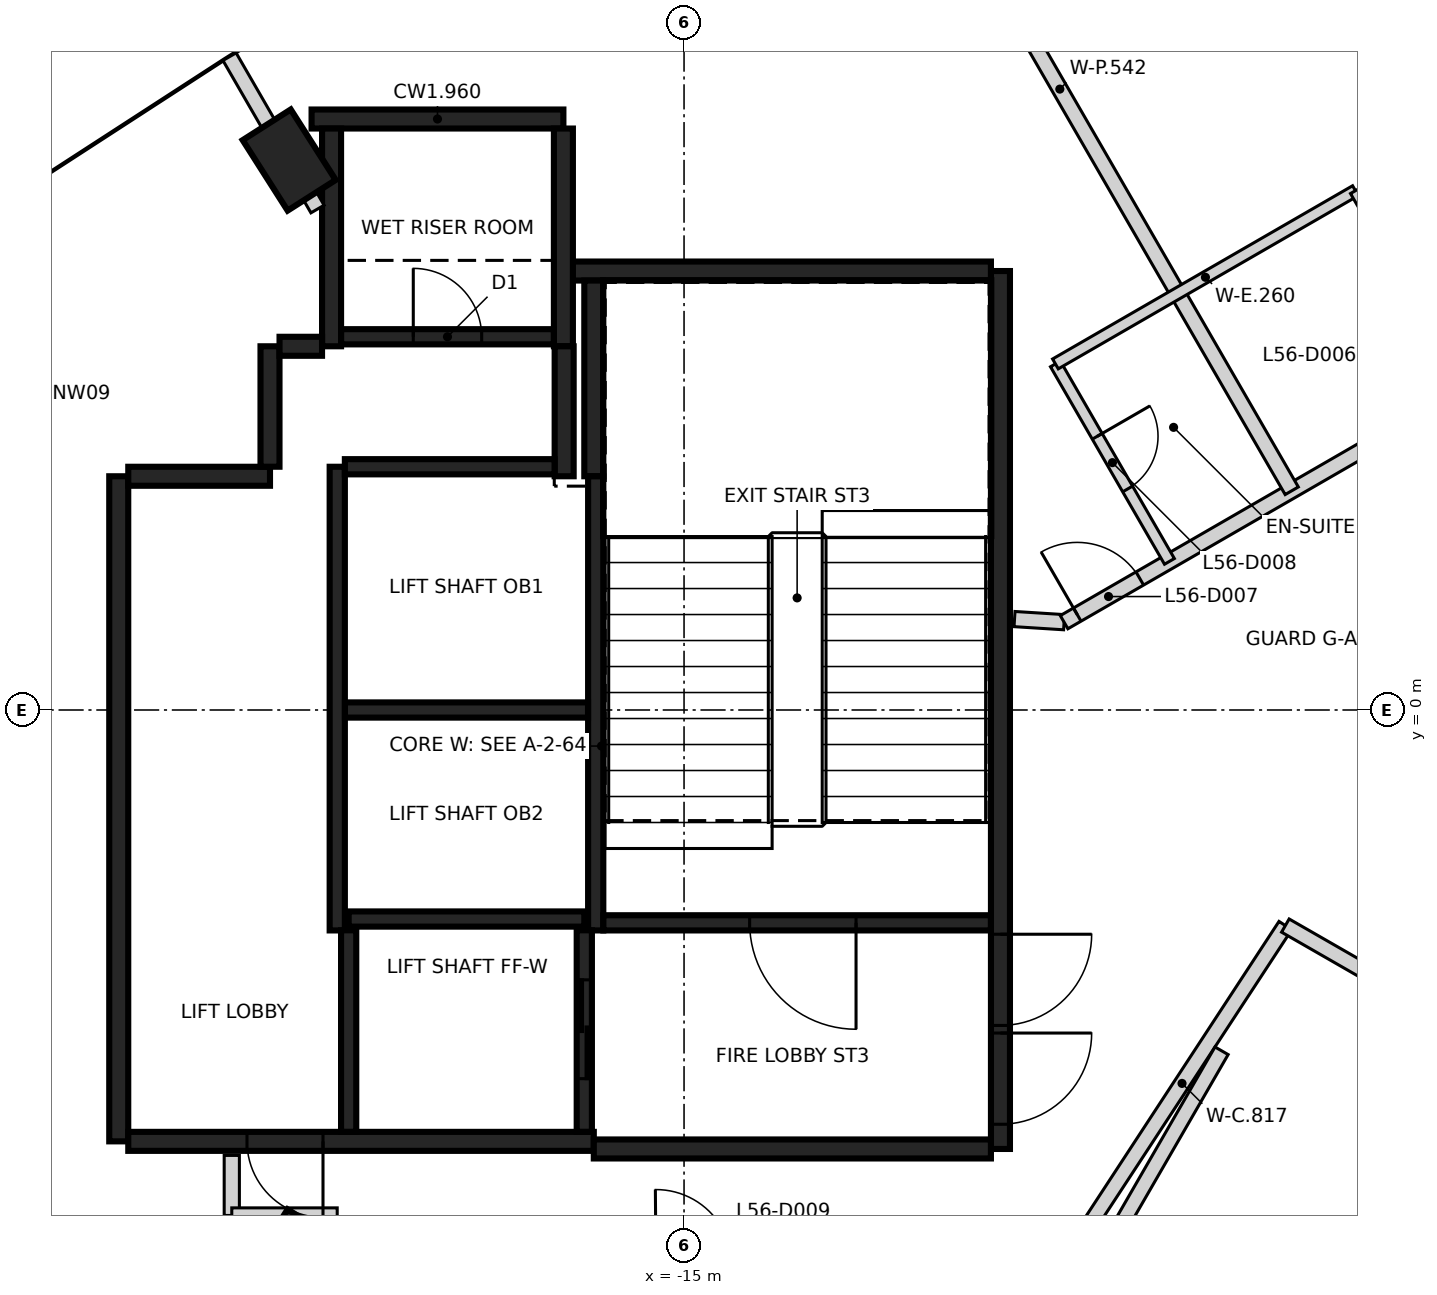
"""IFC4 building model, lengths in metres.
Left out: names, types, materials, properties, quantities, classifications, styles, units other than length and angle.
Written with IfcOpenShell. Run it as: python <this file> out.ifc"""

import sys

from ifc_helpers import new_model, si_unit, direction, frame, frame_2d, origin, origin_2d, place, context, subcontext, project, spatial, rectangle, extrude, element, fill, save


model = new_model("IFC4")
c1 = context("Model", 3, precision=1e-05, world=origin(), true_north=direction((0.0, 1.0)))
c2 = subcontext(c1, "Body", "Model", "MODEL_VIEW")
j1 = project(units=[si_unit("LENGTHUNIT", "METRE"), si_unit("PLANEANGLEUNIT", "RADIAN")], contexts=[c1])
p1 = place(None, origin())
s1 = spatial("IfcSite", under=j1, at=p1, CompositionType="ELEMENT")
p2 = place(p1, origin())
s2 = spatial("IfcBuilding", under=s1, at=p2, CompositionType="ELEMENT")
p3 = place(p2, frame((0.0, 0.0, 225.0)))
s3 = spatial("IfcBuildingStorey", under=s2, at=p3, CompositionType="ELEMENT", Elevation=225.0)
for number, where, z_axis, x_axis in (
    (1, (-20.195, 7.235, -0.35), (0.0, 0.0, 1.0), (-0.538, 0.843, 0.0)),
    (2, (-20.195, -7.235, -0.35), (0.0, 0.0, 1.0), (0.538, 0.843, 0.0)),
):
    element("IfcColumn", number, at=place(p3, frame(where, z_axis=z_axis, x_axis=x_axis)), inside=s3, PredefinedType="COLUMN", context=c2, shape_type="SweptSolid", body=[
        extrude(rectangle(XDim=1.1, YDim=0.75, at=origin_2d()), origin(), (0.0, 0.0, 1.0), 3.6),
    ])
p4 = place(p3, frame((-10.837, 5.775, 0.0), z_axis=(0.0, 0.0, 1.0), x_axis=(0.0, -1.0, 0.0)))
e3 = element("IfcWall", 3, at=p4, inside=s3, PredefinedType="SHEAR", context=c2, shape_type="SweptSolid", body=[
    extrude(rectangle(XDim=11.55, YDim=0.25, at=frame_2d((5.775, 0.0))), origin(), (0.0, 0.0, 1.0), 3.25),
])
p5 = place(p4, frame((10.025, 0.0, 0.0)))
e4 = element("IfcOpeningElement", 4, at=p5, cuts=e3, PredefinedType="OPENING", context=c2, shape_type="SweptSolid", body=[
    extrude(rectangle(XDim=1.2, YDim=2.1, at=frame_2d((0.6, 1.05))), frame((0.0, 0.135, 0.0), z_axis=(0.0, -1.0, 0.0), x_axis=(1.0, 0.0, 0.0)), (0.0, 0.0, 1.0), 0.27),
])
p6 = place(p4, frame((8.725, 0.0, 0.0)))
e5 = element("IfcOpeningElement", 5, at=p6, cuts=e3, PredefinedType="OPENING", context=c2, shape_type="SweptSolid", body=[
    extrude(rectangle(XDim=1.2, YDim=2.1, at=frame_2d((0.6, 1.05))), frame((0.0, 0.135, 0.0), z_axis=(0.0, -1.0, 0.0), x_axis=(1.0, 0.0, 0.0)), (0.0, 0.0, 1.0), 0.27),
])
p7 = place(p3, frame((-22.437, -5.675, 0.0), z_axis=(0.0, 0.0, 1.0), x_axis=(0.0, 1.0, 0.0)))
e6 = element("IfcWall", 6, at=p7, inside=s3, PredefinedType="SHEAR", context=c2, shape_type="SweptSolid", body=[
    extrude(rectangle(XDim=8.75, YDim=0.25, at=frame_2d((4.375, 0.0))), origin(), (0.0, 0.0, 1.0), 3.25),
])
p8 = place(p3, frame((-16.187, -5.675, 0.0), z_axis=(0.0, 0.0, 1.0), x_axis=(-1.0, 0.0, 0.0)))
e7 = element("IfcWall", 7, at=p8, inside=s3, PredefinedType="SHEAR", context=c2, shape_type="SweptSolid", body=[
    extrude(rectangle(XDim=6.125, YDim=0.25, at=frame_2d((3.062, 0.0))), origin(), (0.0, 0.0, 1.0), 3.25),
])
p9 = place(p8, frame((3.563, 0.0, 0.0)))
e8 = element("IfcOpeningElement", 8, at=p9, cuts=e7, PredefinedType="OPENING", context=c2, shape_type="SweptSolid", body=[
    extrude(rectangle(XDim=1.0, YDim=2.1, at=frame_2d((0.5, 1.05))), frame((0.0, 0.135, 0.0), z_axis=(0.0, -1.0, 0.0), x_axis=(1.0, 0.0, 0.0)), (0.0, 0.0, 1.0), 0.27),
])
p10 = place(p3, frame((-10.963, -5.775, 0.0), z_axis=(0.0, 0.0, 1.0), x_axis=(-1.0, 0.0, 0.0)))
e9 = element("IfcWall", 9, at=p10, inside=s3, PredefinedType="SHEAR", context=c2, shape_type="SweptSolid", body=[
    extrude(rectangle(XDim=5.225, YDim=0.25, at=frame_2d((2.612, 0.0))), origin(), (0.0, 0.0, 1.0), 3.25),
])
p11 = place(p3, frame((-16.472, 5.775, 0.0), z_axis=(0.0, 0.0, 1.0), x_axis=(1.0, 0.0, 0.0)))
e10 = element("IfcWall", 10, at=p11, inside=s3, PredefinedType="SHEAR", context=c2, shape_type="SweptSolid", body=[
    extrude(rectangle(XDim=5.51, YDim=0.25, at=frame_2d((2.755, 0.0))), origin(), (0.0, 0.0, 1.0), 3.25),
])
p12 = place(p3, frame((-19.9, 7.775, 0.0), z_axis=(0.0, 0.0, 1.0), x_axis=(1.0, 0.0, 0.0)))
e11 = element("IfcWall", 11, at=p12, inside=s3, PredefinedType="SHEAR", context=c2, shape_type="SweptSolid", body=[
    extrude(rectangle(XDim=3.313, YDim=0.25, at=frame_2d((1.656, 0.0))), origin(), (0.0, 0.0, 1.0), 3.25),
])
for number, where, z_axis, x_axis in (
    (12, (-16.587, 7.65, 0.0), (0.0, 0.0, 1.0), (0.0, -1.0, 0.0)),
    (13, (-19.637, 4.785, 0.0), (0.0, 0.0, 1.0), (0.0, 1.0, 0.0)),
):
    element("IfcWall", number, at=place(p3, frame(where, z_axis=z_axis, x_axis=x_axis)), inside=s3, PredefinedType="SHEAR", context=c2, shape_type="SweptSolid", body=[
        extrude(rectangle(XDim=2.865, YDim=0.25, at=frame_2d((1.432, 0.0))), origin(), (0.0, 0.0, 1.0), 3.25),
    ])
p13 = place(p3, frame((-16.187, 3.075, 0.0), z_axis=(0.0, 0.0, 1.0), x_axis=(0.0, 1.0, 0.0)))
e14 = element("IfcWall", 14, at=p13, inside=s3, PredefinedType="SHEAR", context=c2, shape_type="SweptSolid", body=[
    extrude(rectangle(XDim=2.575, YDim=0.25, at=frame_2d((1.287, 0.0))), origin(), (0.0, 0.0, 1.0), 3.25),
])
p14 = place(p3, frame((-22.312, 3.075, 0.0), z_axis=(0.0, 0.0, 1.0), x_axis=(1.0, 0.0, 0.0)))
e15 = element("IfcWall", 15, at=p14, inside=s3, PredefinedType="SHEAR", context=c2, shape_type="SweptSolid", body=[
    extrude(rectangle(XDim=1.865, YDim=0.25, at=frame_2d((0.932, 0.0))), origin(), (0.0, 0.0, 1.0), 3.25),
])
p15 = place(p3, frame((-16.577, 4.785, 0.0), z_axis=(0.0, 0.0, 1.0), x_axis=(0.0, -1.0, 0.0)))
e16 = element("IfcWall", 16, at=p15, inside=s3, PredefinedType="SHEAR", context=c2, shape_type="SweptSolid", body=[
    extrude(rectangle(XDim=1.71, YDim=0.25, at=frame_2d((0.855, 0.0))), origin(), (0.0, 0.0, 1.0), 3.25),
])
p16 = place(p3, frame((-20.447, 3.2, 0.0), z_axis=(0.0, 0.0, 1.0), x_axis=(0.0, 1.0, 0.0)))
e17 = element("IfcWall", 17, at=p16, inside=s3, PredefinedType="SHEAR", context=c2, shape_type="SweptSolid", body=[
    extrude(rectangle(XDim=1.584, YDim=0.25, at=frame_2d((0.792, 0.0))), origin(), (0.0, 0.0, 1.0), 3.25),
])
p17 = place(p3, frame((-20.322, 4.785, 0.0), z_axis=(0.0, 0.0, 1.0), x_axis=(1.0, 0.0, 0.0)))
e18 = element("IfcWall", 18, at=p17, inside=s3, PredefinedType="SHEAR", context=c2, shape_type="SweptSolid", body=[
    extrude(rectangle(XDim=0.559, YDim=0.25, at=frame_2d((0.28, 0.0))), origin(), (0.0, 0.0, 1.0), 3.25),
])
p18 = place(p3, frame((-16.162, 3.074, 0.0), z_axis=(0.0, 0.0, 1.0), x_axis=(0.0, -1.0, 0.0)))
e19 = element("IfcWall", 19, at=p18, inside=s3, PredefinedType="SHEAR", context=c2, shape_type="SweptSolid", body=[
    extrude(rectangle(XDim=5.974, YDim=0.2, at=frame_2d((2.987, 0.0))), origin(), (0.0, 0.0, 1.0), 3.25),
])
p19 = place(p3, frame((-19.562, -2.9, 0.0), z_axis=(0.0, 0.0, 1.0), x_axis=(0.0, 1.0, 0.0)))
e20 = element("IfcWall", 20, at=p19, inside=s3, PredefinedType="SHEAR", context=c2, shape_type="SweptSolid", body=[
    extrude(rectangle(XDim=6.1, YDim=0.2, at=frame_2d((3.05, 0.0))), origin(), (0.0, 0.0, 1.0), 3.25),
])
p20 = place(p3, frame((-10.963, -2.8, 0.0), z_axis=(0.0, 0.0, 1.0), x_axis=(-1.0, 0.0, 0.0)))
e21 = element("IfcWall", 21, at=p20, inside=s3, PredefinedType="SHEAR", context=c2, shape_type="SweptSolid", body=[
    extrude(rectangle(XDim=5.098, YDim=0.2, at=frame_2d((2.549, 0.0))), origin(), (0.0, 0.0, 1.0), 3.25),
])
p21 = place(p20, frame((1.774, 0.0, 0.0)))
e22 = element("IfcOpeningElement", 22, at=p21, cuts=e21, PredefinedType="OPENING", context=c2, shape_type="SweptSolid", body=[
    extrude(rectangle(XDim=1.4, YDim=2.1, at=frame_2d((0.7, 1.05))), frame((0.0, 0.11, 0.0), z_axis=(0.0, -1.0, 0.0), x_axis=(1.0, 0.0, 0.0)), (0.0, 0.0, 1.0), 0.22),
])
p22 = place(p3, frame((-16.263, 0.0, 0.0), z_axis=(0.0, 0.0, 1.0), x_axis=(-1.0, 0.0, 0.0)))
e23 = element("IfcWall", 23, at=p22, inside=s3, PredefinedType="SHEAR", context=c2, shape_type="SweptSolid", body=[
    extrude(rectangle(XDim=3.198, YDim=0.2, at=frame_2d((1.599, 0.0))), origin(), (0.0, 0.0, 1.0), 3.25),
])
p23 = place(p3, frame((-19.511, 4.91, 0.0), z_axis=(0.0, 0.0, 1.0), x_axis=(1.0, 0.0, 0.0)))
e24 = element("IfcWall", 24, at=p23, inside=s3, PredefinedType="SHEAR", context=c2, shape_type="SweptSolid", body=[
    extrude(rectangle(XDim=2.798, YDim=0.2, at=frame_2d((1.399, 0.0))), origin(), (0.0, 0.0, 1.0), 3.25),
])
p24 = place(p23, frame((0.949, 0.0, 0.0)))
e25 = element("IfcOpeningElement", 25, at=p24, cuts=e24, PredefinedType="OPENING", context=c2, shape_type="SweptSolid", body=[
    extrude(rectangle(XDim=0.9, YDim=2.1, at=frame_2d((0.45, 1.05))), frame((0.0, 0.11, 0.0), z_axis=(0.0, -1.0, 0.0), x_axis=(1.0, 0.0, 0.0)), (0.0, 0.0, 1.0), 0.22),
])
p25 = place(p3, frame((-19.462, 3.2, 0.0), z_axis=(0.0, 0.0, 1.0), x_axis=(1.0, 0.0, 0.0)))
e26 = element("IfcWall", 26, at=p25, inside=s3, PredefinedType="SHEAR", context=c2, shape_type="SweptSolid", body=[
    extrude(rectangle(XDim=2.759, YDim=0.2, at=frame_2d((1.379, 0.0))), origin(), (0.0, 0.0, 1.0), 3.25),
])
p26 = place(p3, frame((-19.412, -2.75, 0.0), z_axis=(0.0, 0.0, 1.0), x_axis=(1.0, 0.0, 0.0)))
e27 = element("IfcWall", 27, at=p26, inside=s3, PredefinedType="SHEAR", context=c2, shape_type="SweptSolid", body=[
    extrude(rectangle(XDim=3.1, YDim=0.2, at=frame_2d((1.55, 0.0))), origin(), (0.0, 0.0, 1.0), 3.25),
])
p27 = place(p3, frame((-16.312, -2.898, 0.0), z_axis=(0.0, 0.0, 1.0), x_axis=(0.0, -1.0, 0.0)))
e28 = element("IfcWall", 28, at=p27, inside=s3, PredefinedType="SHEAR", context=c2, shape_type="SweptSolid", body=[
    extrude(rectangle(XDim=2.651, YDim=0.2, at=frame_2d((1.325, 0.0))), origin(), (0.0, 0.0, 1.0), 3.25),
])
p28 = place(p27, frame((0.652, 0.0, 0.0)))
e29 = element("IfcOpeningElement", 29, at=p28, cuts=e28, PredefinedType="OPENING", context=c2, shape_type="SweptSolid", body=[
    extrude(rectangle(XDim=1.3, YDim=2.1, at=frame_2d((0.65, 1.05))), frame((0.0, 0.11, 0.0), z_axis=(0.0, -1.0, 0.0), x_axis=(1.0, 0.0, 0.0)), (0.0, 0.0, 1.0), 0.22),
])
p29 = place(p3, frame((-19.412, -5.549, 0.0), z_axis=(0.0, 0.0, 1.0), x_axis=(0.0, 1.0, 0.0)))
e30 = element("IfcWall", 30, at=p29, inside=s3, PredefinedType="SHEAR", context=c2, shape_type="SweptSolid", body=[
    extrude(rectangle(XDim=2.651, YDim=0.2, at=frame_2d((1.325, 0.0))), origin(), (0.0, 0.0, 1.0), 3.25),
])
p30 = place(p3, frame((-20.95, -6.65, 0.0), z_axis=(0.0, 0.0, 1.0), x_axis=(0.0, 1.0, 0.0)))
e31 = element("IfcWall", 31, at=p30, inside=s3, PredefinedType="PARTITIONING", context=c2, shape_type="SweptSolid", body=[
    extrude(rectangle(XDim=0.79, YDim=0.2, at=frame_2d((0.395, 0.0))), origin(), (0.0, 0.0, 1.0), 2.35),
])
p31 = place(p3, frame((-20.95, -6.65, 0.0), z_axis=(0.0, 0.0, 1.0), x_axis=(1.0, 0.0, 0.0)))
e32 = element("IfcWall", 32, at=p31, inside=s3, PredefinedType="PARTITIONING", context=c2, shape_type="SweptSolid", body=[
    extrude(rectangle(XDim=1.387, YDim=0.2, at=frame_2d((0.693, 0.0))), origin(), (0.0, 0.0, 1.0), 2.35),
])
p32 = place(p3, frame((-10.652, 1.196, 0.0), z_axis=(0.0, 0.0, 1.0), x_axis=(0.998005794618, -0.063122372489, 0.0)))
e33 = element("IfcWall", 33, at=p32, inside=s3, PredefinedType="PARTITIONING", context=c2, shape_type="SweptSolid", body=[
    extrude(rectangle(XDim=0.654, YDim=0.2, at=frame_2d((0.327, 0.0))), origin(), (0.0, 0.0, 1.0), 3.25),
])
p33 = place(p3, frame((-10.0, 1.155, 0.0), z_axis=(0.0, 0.0, 1.0), x_axis=(0.866014095592, 0.500019585852, 0.0)))
e34 = element("IfcWall", 34, at=p33, inside=s3, PredefinedType="PARTITIONING", context=c2, shape_type="SweptSolid", body=[
    extrude(rectangle(XDim=12.708, YDim=0.2, at=frame_2d((6.354, 0.0))), origin(), (0.0, 0.0, 1.0), 3.25),
])
p34 = place(p33, frame((6.944, 0.0, 0.0)))
e35 = element("IfcOpeningElement", 35, at=p34, cuts=e34, PredefinedType="OPENING", context=c2, shape_type="SweptSolid", body=[
    extrude(rectangle(XDim=0.95, YDim=2.1, at=frame_2d((0.475, 1.05))), frame((0.0, 0.11, 0.0), z_axis=(0.0, -1.0, 0.0), x_axis=(1.0, 0.0, 0.0)), (0.0, 0.0, 1.0), 0.22),
])
p35 = place(p33, frame((0.2, 0.0, 0.0)))
e36 = element("IfcOpeningElement", 36, at=p35, cuts=e34, PredefinedType="OPENING", context=c2, shape_type="SweptSolid", body=[
    extrude(rectangle(XDim=0.95, YDim=2.1, at=frame_2d((0.475, 1.05))), frame((0.0, 0.11, 0.0), z_axis=(0.0, -1.0, 0.0), x_axis=(1.0, 0.0, 0.0)), (0.0, 0.0, 1.0), 0.22),
])
p36 = place(p3, frame((-9.808, -6.989, 0.0), z_axis=(0.0, 0.0, 1.0), x_axis=(0.547746188785, 0.836644555753, 0.0)))
e37 = element("IfcWall", 37, at=p36, inside=s3, PredefinedType="PARTITIONING", context=c2, shape_type="SweptSolid", body=[
    extrude(rectangle(XDim=4.964, YDim=0.2, at=frame_2d((2.482, 0.0))), origin(), (0.0, 0.0, 1.0), 3.25),
])
p37 = place(p3, frame((-7.089, -2.836, 0.0), z_axis=(0.0, 0.0, 1.0), x_axis=(0.867106243364, -0.498123240493, 0.0)))
e38 = element("IfcWall", 38, at=p37, inside=s3, PredefinedType="PARTITIONING", context=c2, shape_type="SweptSolid", body=[
    extrude(rectangle(XDim=12.804, YDim=0.2, at=frame_2d((6.402, 0.0))), origin(), (0.0, 0.0, 1.0), 3.25),
])
p38 = place(p37, frame((1.909, 0.0, 0.0)))
e39 = element("IfcOpeningElement", 39, at=p38, cuts=e38, PredefinedType="OPENING", context=c2, shape_type="SweptSolid", body=[
    extrude(rectangle(XDim=1.0, YDim=2.1, at=frame_2d((0.5, 1.05))), frame((0.0, 0.11, 0.0), z_axis=(0.0, -1.0, 0.0), x_axis=(1.0, 0.0, 0.0)), (0.0, 0.0, 1.0), 0.22),
])
p39 = place(p37, frame((4.91, 0.0, 0.0)))
e40 = element("IfcOpeningElement", 40, at=p39, cuts=e38, PredefinedType="OPENING", context=c2, shape_type="SweptSolid", body=[
    extrude(rectangle(XDim=0.95, YDim=2.1, at=frame_2d((0.475, 1.05))), frame((0.0, 0.11, 0.0), z_axis=(0.0, -1.0, 0.0), x_axis=(1.0, 0.0, 0.0)), (0.0, 0.0, 1.0), 0.22),
])
p40 = place(p37, frame((11.654, 0.0, 0.0)))
e41 = element("IfcOpeningElement", 41, at=p40, cuts=e38, PredefinedType="OPENING", context=c2, shape_type="SweptSolid", body=[
    extrude(rectangle(XDim=0.95, YDim=2.1, at=frame_2d((0.475, 1.05))), frame((0.0, 0.11, 0.0), z_axis=(0.0, -1.0, 0.0), x_axis=(1.0, 0.0, 0.0)), (0.0, 0.0, 1.0), 0.22),
])
p41 = place(p3, frame((-20.979, 8.595, 0.0), z_axis=(0.0, 0.0, 1.0), x_axis=(0.499950711303, -0.866053858757, 0.0)))
e42 = element("IfcWall", 42, at=p41, inside=s3, PredefinedType="PARTITIONING", context=c2, shape_type="SweptSolid", body=[
    extrude(rectangle(XDim=2.315, YDim=0.2, at=frame_2d((1.157, 0.0))), origin(), (0.0, 0.0, 1.0), 3.25),
])
p42 = place(p3, frame((-13.107, 13.453, 0.0), z_axis=(0.0, 0.0, 1.0), x_axis=(0.500037611077, -0.86600368793, 0.0)))
e43 = element("IfcWall", 43, at=p42, inside=s3, PredefinedType="PARTITIONING", context=c2, shape_type="SweptSolid", body=[
    extrude(rectangle(XDim=12.204, YDim=0.2, at=frame_2d((6.102, 0.0))), origin(), (0.0, 0.0, 1.0), 3.25),
])
p43 = place(p3, frame((-13.107, -13.453, 0.0), z_axis=(0.0, 0.0, 1.0), x_axis=(0.500020349827, 0.866013654488, 0.0)))
e44 = element("IfcWall", 44, at=p43, inside=s3, PredefinedType="PARTITIONING", context=c2, shape_type="SweptSolid", body=[
    extrude(rectangle(XDim=10.357, YDim=0.2, at=frame_2d((5.179, 0.0))), origin(), (0.0, 0.0, 1.0), 3.25),
])
for number, where, z_axis, x_axis in (
    (45, (-9.119, 15.795, 0.0), (0.0, 0.0, 1.0), (0.5, -0.866, 0.0)),
    (46, (-9.119, -15.795, 0.0), (0.0, 0.0, 1.0), (0.5, 0.866, 0.0)),
):
    element("IfcWall", number, at=place(p3, frame(where, z_axis=z_axis, x_axis=x_axis)), inside=s3, PredefinedType="PARTITIONING", context=c2, shape_type="SweptSolid", body=[
        extrude(rectangle(XDim=12.238, YDim=0.2, at=frame_2d((6.119, 0.0))), origin(), (0.0, 0.0, 1.0), 3.25),
    ])
p44 = place(p3, frame((-10.114, 4.553, 0.0), z_axis=(0.0, 0.0, 1.0), x_axis=(0.50002537861, -0.866010750942, 0.0)))
e47 = element("IfcWall", 47, at=p44, inside=s3, PredefinedType="PARTITIONING", context=c2, shape_type="SweptSolid", body=[
    extrude(rectangle(XDim=3.0, YDim=0.15, at=frame_2d((1.5, 0.0))), origin(), (0.0, 0.0, 1.0), 3.25),
])
p45 = place(p44, frame((1.1, 0.0, 0.0)))
e48 = element("IfcOpeningElement", 48, at=p45, cuts=e47, PredefinedType="OPENING", context=c2, shape_type="SweptSolid", body=[
    extrude(rectangle(XDim=0.8, YDim=2.1, at=frame_2d((0.4, 1.05))), frame((0.0, 0.085, 0.0), z_axis=(0.0, -1.0, 0.0), x_axis=(1.0, 0.0, 0.0)), (0.0, 0.0, 1.0), 0.17),
])
p46 = place(p3, frame((-10.114, 4.553, 0.0), z_axis=(0.0, 0.0, 1.0), x_axis=(0.866002713795, 0.500039298155, 0.0)))
e49 = element("IfcWall", 49, at=p46, inside=s3, PredefinedType="PARTITIONING", context=c2, shape_type="SweptSolid", body=[
    extrude(rectangle(XDim=4.558, YDim=0.15, at=frame_2d((2.279, 0.0))), origin(), (0.0, 0.0, 1.0), 3.25),
])
p47 = place(p3, frame((-6.167, 6.832, 0.0), z_axis=(0.0, 0.0, 1.0), x_axis=(0.499990139034, -0.866031096941, 0.0)))
e50 = element("IfcWall", 50, at=p47, inside=s3, PredefinedType="PARTITIONING", context=c2, shape_type="SweptSolid", body=[
    extrude(rectangle(XDim=3.0, YDim=0.15, at=frame_2d((1.5, 0.0))), origin(), (0.0, 0.0, 1.0), 3.25),
])
p48 = place(p47, frame((1.1, 0.0, 0.0)))
e51 = element("IfcOpeningElement", 51, at=p48, cuts=e50, PredefinedType="OPENING", context=c2, shape_type="SweptSolid", body=[
    extrude(rectangle(XDim=0.8, YDim=2.1, at=frame_2d((0.4, 1.05))), frame((0.0, 0.085, 0.0), z_axis=(0.0, -1.0, 0.0), x_axis=(1.0, 0.0, 0.0)), (0.0, 0.0, 1.0), 0.17),
])
p49 = place(p28, origin())
e52 = element("IfcDoor", 52, at=p49, inside=s3, OperationType="SLIDING_TO_RIGHT", PredefinedType="DOOR", context=c2, shape_type="SweptSolid", body=[
    extrude(rectangle(XDim=1.3, YDim=2.1, at=frame_2d((0.65, 1.05))), frame((0.0, 0.025, 0.0), z_axis=(0.0, -1.0, 0.0), x_axis=(1.0, 0.0, 0.0)), (0.0, 0.0, 1.0), 0.05),
])
fill(e29, e52)
p50 = place(p9, origin())
e53 = element("IfcDoor", 53, at=p50, inside=s3, OperationType="SINGLE_SWING_LEFT", PredefinedType="DOOR", context=c2, shape_type="SweptSolid", body=[
    extrude(rectangle(XDim=1.0, YDim=2.1, at=frame_2d((0.5, 1.05))), frame((0.0, 0.025, 0.0), z_axis=(0.0, -1.0, 0.0), x_axis=(1.0, 0.0, 0.0)), (0.0, 0.0, 1.0), 0.05),
])
fill(e8, e53)
p51 = place(p5, origin())
e54 = element("IfcDoor", 54, at=p51, inside=s3, OperationType="SINGLE_SWING_LEFT", PredefinedType="DOOR", context=c2, shape_type="SweptSolid", body=[
    extrude(rectangle(XDim=1.2, YDim=2.1, at=frame_2d((0.6, 1.05))), frame((0.0, 0.025, 0.0), z_axis=(0.0, -1.0, 0.0), x_axis=(1.0, 0.0, 0.0)), (0.0, 0.0, 1.0), 0.05),
])
fill(e4, e54)
p52 = place(p6, origin())
e55 = element("IfcDoor", 55, at=p52, inside=s3, OperationType="SINGLE_SWING_RIGHT", PredefinedType="DOOR", context=c2, shape_type="SweptSolid", body=[
    extrude(rectangle(XDim=1.2, YDim=2.1, at=frame_2d((0.6, 1.05))), frame((0.0, 0.025, 0.0), z_axis=(0.0, -1.0, 0.0), x_axis=(1.0, 0.0, 0.0)), (0.0, 0.0, 1.0), 0.05),
])
fill(e5, e55)
p53 = place(p21, origin())
e56 = element("IfcDoor", 56, at=p53, inside=s3, OperationType="SINGLE_SWING_RIGHT", PredefinedType="DOOR", context=c2, shape_type="SweptSolid", body=[
    extrude(rectangle(XDim=1.4, YDim=2.1, at=frame_2d((0.7, 1.05))), frame((0.0, 0.025, 0.0), z_axis=(0.0, -1.0, 0.0), x_axis=(1.0, 0.0, 0.0)), (0.0, 0.0, 1.0), 0.05),
])
fill(e22, e56)
p54 = place(p24, origin())
e57 = element("IfcDoor", 57, at=p54, inside=s3, OperationType="SINGLE_SWING_LEFT", PredefinedType="DOOR", context=c2, shape_type="SweptSolid", body=[
    extrude(rectangle(XDim=0.9, YDim=2.1, at=frame_2d((0.45, 1.05))), frame((0.0, 0.025, 0.0), z_axis=(0.0, -1.0, 0.0), x_axis=(1.0, 0.0, 0.0)), (0.0, 0.0, 1.0), 0.05),
])
fill(e25, e57)
p55 = place(p35, origin())
e58 = element("IfcDoor", 58, at=p55, inside=s3, OperationType="SINGLE_SWING_LEFT", PredefinedType="DOOR", context=c2, shape_type="SweptSolid", body=[
    extrude(rectangle(XDim=0.95, YDim=2.1, at=frame_2d((0.475, 1.05))), frame((0.0, 0.025, 0.0), z_axis=(0.0, -1.0, 0.0), x_axis=(1.0, 0.0, 0.0)), (0.0, 0.0, 1.0), 0.05),
])
fill(e36, e58)
p56 = place(p45, frame((0.8, 0.0, 0.0), z_axis=(0.0, 0.0, 1.0), x_axis=(-1.0, 0.0, 0.0)))
e59 = element("IfcDoor", 59, at=p56, inside=s3, OperationType="SINGLE_SWING_LEFT", PredefinedType="DOOR", context=c2, shape_type="SweptSolid", body=[
    extrude(rectangle(XDim=0.8, YDim=2.1, at=frame_2d((0.4, 1.05))), frame((0.0, 0.025, 0.0), z_axis=(0.0, -1.0, 0.0), x_axis=(1.0, 0.0, 0.0)), (0.0, 0.0, 1.0), 0.05),
])
fill(e48, e59)
save(model, sys.argv[1])
